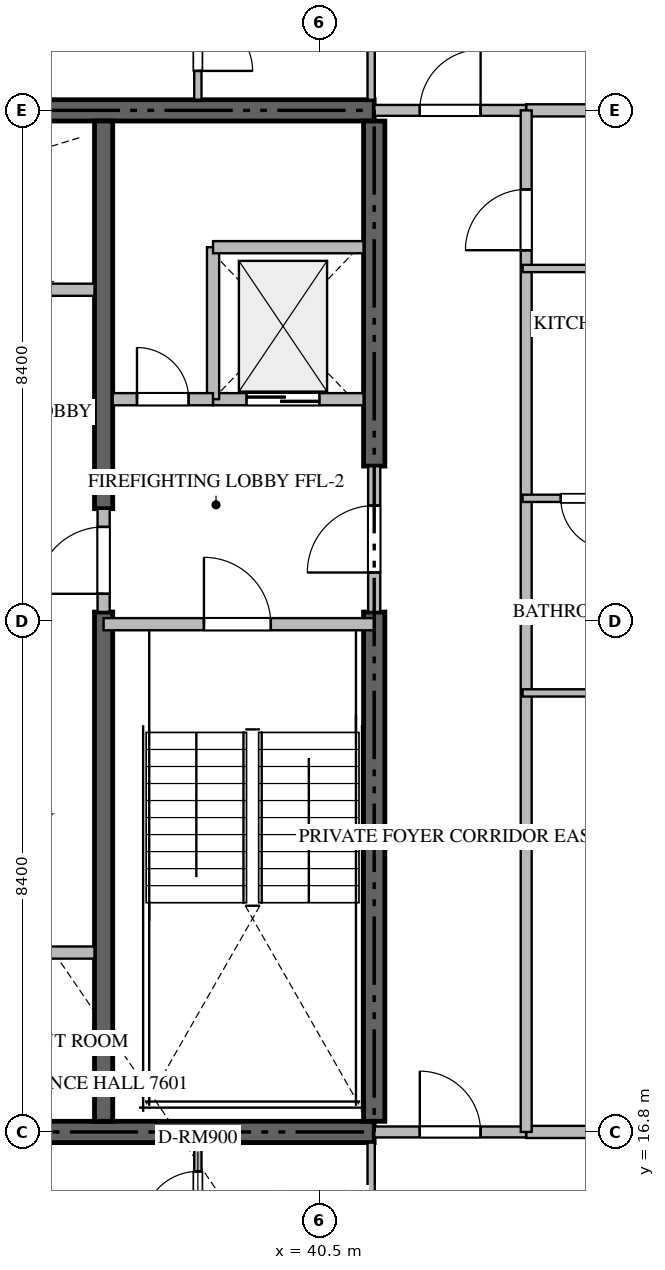
"""IFC4 building model, lengths in metres.
Left out: names, types, materials, properties, quantities, classifications, styles, units other than length and angle.
Written with IfcOpenShell. Run it as: python <this file> out.ifc"""

import sys

from ifc_helpers import new_model, si_unit, direction, frame, frame_2d, origin, place, context, subcontext, project, spatial, rectangle, extrude, source, transform, mapped, element, fill, save


model = new_model("IFC4")
c1 = context("Model", 3, precision=1e-05, world=origin(), true_north=direction((0.0, 1.0)))
c2 = subcontext(c1, "Body", "Model", "MODEL_VIEW")
j1 = project(units=[si_unit("LENGTHUNIT", "METRE"), si_unit("PLANEANGLEUNIT", "RADIAN")], contexts=[c1])
p1 = place(None, origin())
s1 = spatial("IfcSite", under=j1, at=p1, CompositionType="ELEMENT")
p2 = place(p1, origin())
s2 = spatial("IfcBuilding", under=s1, at=p2, CompositionType="ELEMENT")
p3 = place(p2, frame((0.0, 0.0, 305.6)))
s3 = spatial("IfcBuildingStorey", under=s2, at=p3, CompositionType="ELEMENT", Elevation=305.6)
for number, where, z_axis, x_axis in (
    (1, (23.4, 16.8, -0.26), (0.0, 0.0, 1.0), (1.0, 0.0, 0.0)),
    (2, (41.4, 33.6, -0.26), (0.0, 0.0, 1.0), (-1.0, 0.0, 0.0)),
):
    element("IfcWall", number, at=place(p3, frame(where, z_axis=z_axis, x_axis=x_axis)), inside=s3, PredefinedType="SHEAR", context=c2, shape_type="SweptSolid", body=[
        extrude(rectangle(XDim=18.0, YDim=0.35, at=frame_2d((9.0, 0.0))), origin(), (0.0, 0.0, 1.0), 4.048),
    ])
p4 = place(p3, frame((41.4, 16.975, -0.26), z_axis=(0.0, 0.0, 1.0), x_axis=(0.0, 1.0, 0.0)))
e3 = element("IfcWall", 3, at=p4, inside=s3, PredefinedType="SHEAR", context=c2, shape_type="SweptSolid", body=[
    extrude(rectangle(XDim=8.375, YDim=0.35, at=frame_2d((4.188, 0.0))), origin(), (0.0, 0.0, 1.0), 4.048),
])
p5 = place(p3, frame((41.4, 27.75, -0.26), z_axis=(0.0, 0.0, 1.0), x_axis=(0.0, 1.0, 0.0)))
e4 = element("IfcWall", 4, at=p5, inside=s3, PredefinedType="SHEAR", context=c2, shape_type="SweptSolid", body=[
    extrude(rectangle(XDim=5.675, YDim=0.35, at=frame_2d((2.837, 0.0))), origin(), (0.0, 0.0, 1.0), 4.048),
])
p6 = place(p3, frame((36.95, 16.975, -0.26), z_axis=(0.0, 0.0, 1.0), x_axis=(0.0, 1.0, 0.0)))
e5 = element("IfcWall", 5, at=p6, inside=s3, PredefinedType="SHEAR", context=c2, shape_type="SweptSolid", body=[
    extrude(rectangle(XDim=8.375, YDim=0.3, at=frame_2d((4.188, 0.0))), origin(), (0.0, 0.0, 1.0), 4.048),
])
p7 = place(p3, frame((36.95, 27.05, -0.26), z_axis=(0.0, 0.0, 1.0), x_axis=(0.0, 1.0, 0.0)))
e6 = element("IfcWall", 6, at=p7, inside=s3, PredefinedType="SHEAR", context=c2, shape_type="SweptSolid", body=[
    extrude(rectangle(XDim=6.375, YDim=0.3, at=frame_2d((3.188, 0.0))), origin(), (0.0, 0.0, 1.0), 4.048),
])
p8 = place(p3, frame((36.95, 25.15, 0.0), z_axis=(0.0, 0.0, 1.0), x_axis=(1.0, 0.0, 0.0)))
e7 = element("IfcWall", 7, at=p8, inside=s3, PredefinedType="STANDARD", context=c2, shape_type="SweptSolid", body=[
    extrude(rectangle(XDim=4.45, YDim=0.2, at=frame_2d((2.225, 0.0))), origin(), (0.0, 0.0, 1.0), 3.79),
])
p9 = place(p8, frame((1.65, 0.0, 0.0)))
e8 = element("IfcOpeningElement", 8, at=p9, cuts=e7, PredefinedType="OPENING", context=c2, shape_type="SweptSolid", body=[
    extrude(rectangle(XDim=1.1, YDim=2.15, at=frame_2d((0.55, 1.075))), frame((0.0, 0.11, 0.0), z_axis=(0.0, -1.0, 0.0), x_axis=(1.0, 0.0, 0.0)), (0.0, 0.0, 1.0), 0.22),
])
p10 = place(p3, frame((38.75, 28.85, 0.0), z_axis=(0.0, 0.0, 1.0), x_axis=(1.0, 0.0, 0.0)))
e9 = element("IfcWall", 9, at=p10, inside=s3, PredefinedType="STANDARD", context=c2, shape_type="SweptSolid", body=[
    extrude(rectangle(XDim=2.475, YDim=0.2, at=frame_2d((1.238, 0.0))), origin(), (0.0, 0.0, 1.0), 3.79),
])
p11 = place(p10, frame((0.55, 0.0, 0.0)))
e10 = element("IfcOpeningElement", 10, at=p11, cuts=e9, PredefinedType="OPENING", context=c2, shape_type="SweptSolid", body=[
    extrude(rectangle(XDim=1.2, YDim=2.2, at=frame_2d((0.6, 1.1))), frame((0.0, 0.11, 0.0), z_axis=(0.0, -1.0, 0.0), x_axis=(1.0, 0.0, 0.0)), (0.0, 0.0, 1.0), 0.22),
])
p12 = place(p3, frame((35.0, 30.65, 0.0), z_axis=(0.0, 0.0, 1.0), x_axis=(1.0, 0.0, 0.0)))
e11 = element("IfcWall", 11, at=p12, inside=s3, PredefinedType="STANDARD", context=c2, shape_type="SweptSolid", body=[
    extrude(rectangle(XDim=1.8, YDim=0.2, at=frame_2d((0.9, 0.0))), origin(), (0.0, 0.0, 1.0), 3.79),
])
p13 = place(p3, frame((38.75, 28.85, 0.0), z_axis=(0.0, 0.0, 1.0), x_axis=(0.0, 1.0, 0.0)))
e12 = element("IfcWall", 12, at=p13, inside=s3, PredefinedType="STANDARD", context=c2, shape_type="SweptSolid", body=[
    extrude(rectangle(XDim=2.5, YDim=0.2, at=frame_2d((1.25, 0.0))), origin(), (0.0, 0.0, 1.0), 3.79),
])
p14 = place(p3, frame((38.75, 31.35, 0.0), z_axis=(0.0, 0.0, 1.0), x_axis=(1.0, 0.0, 0.0)))
e13 = element("IfcWall", 13, at=p14, inside=s3, PredefinedType="STANDARD", context=c2, shape_type="SweptSolid", body=[
    extrude(rectangle(XDim=2.475, YDim=0.2, at=frame_2d((1.238, 0.0))), origin(), (0.0, 0.0, 1.0), 3.79),
])
p15 = place(p3, frame((37.1, 28.85, 0.0), z_axis=(0.0, 0.0, 1.0), x_axis=(1.0, 0.0, 0.0)))
e14 = element("IfcWall", 14, at=p15, inside=s3, PredefinedType="STANDARD", context=c2, shape_type="SweptSolid", body=[
    extrude(rectangle(XDim=1.648, YDim=0.2, at=frame_2d((0.824, 0.0))), origin(), (0.0, 0.0, 1.0), 3.79),
])
p16 = place(p15, frame((0.399, 0.0, 0.0)))
e15 = element("IfcOpeningElement", 15, at=p16, cuts=e14, PredefinedType="OPENING", context=c2, shape_type="SweptSolid", body=[
    extrude(rectangle(XDim=0.85, YDim=2.1, at=frame_2d((0.425, 1.05))), frame((0.0, 0.11, 0.0), z_axis=(0.0, -1.0, 0.0), x_axis=(1.0, 0.0, 0.0)), (0.0, 0.0, 1.0), 0.22),
])
p17 = place(p3, frame((41.4, 25.352, 0.0), z_axis=(0.0, 0.0, 1.0), x_axis=(0.0, 1.0, 0.0)))
e16 = element("IfcWall", 16, at=p17, inside=s3, PredefinedType="STANDARD", context=c2, shape_type="SweptSolid", body=[
    extrude(rectangle(XDim=2.396, YDim=0.2, at=frame_2d((1.198, 0.0))), origin(), (0.0, 0.0, 1.0), 3.79),
])
p18 = place(p17, frame((0.648, 0.0, 0.0)))
e17 = element("IfcOpeningElement", 17, at=p18, cuts=e16, PredefinedType="OPENING", context=c2, shape_type="SweptSolid", body=[
    extrude(rectangle(XDim=1.1, YDim=2.15, at=frame_2d((0.55, 1.075))), frame((0.0, 0.11, 0.0), z_axis=(0.0, -1.0, 0.0), x_axis=(1.0, 0.0, 0.0)), (0.0, 0.0, 1.0), 0.22),
])
p19 = place(p3, frame((36.95, 25.352, 0.0), z_axis=(0.0, 0.0, 1.0), x_axis=(0.0, 1.0, 0.0)))
e18 = element("IfcWall", 18, at=p19, inside=s3, PredefinedType="STANDARD", context=c2, shape_type="SweptSolid", body=[
    extrude(rectangle(XDim=1.696, YDim=0.2, at=frame_2d((0.848, 0.0))), origin(), (0.0, 0.0, 1.0), 3.79),
])
p20 = place(p19, frame((0.298, 0.0, 0.0)))
e19 = element("IfcOpeningElement", 19, at=p20, cuts=e18, PredefinedType="OPENING", context=c2, shape_type="SweptSolid", body=[
    extrude(rectangle(XDim=1.1, YDim=2.15, at=frame_2d((0.55, 1.075))), frame((0.0, 0.11, 0.0), z_axis=(0.0, -1.0, 0.0), x_axis=(1.0, 0.0, 0.0)), (0.0, 0.0, 1.0), 0.22),
])
p21 = place(p3, frame((28.0, 19.75, 0.0), z_axis=(0.0, 0.0, 1.0), x_axis=(1.0, 0.0, 0.0)))
e20 = element("IfcWall", 20, at=p21, inside=s3, PredefinedType="STANDARD", context=c2, shape_type="SweptSolid", body=[
    extrude(rectangle(XDim=8.8, YDim=0.2, at=frame_2d((4.4, 0.0))), origin(), (0.0, 0.0, 1.0), 3.79),
])
p22 = place(p21, frame((3.95, 0.0, 0.0)))
e21 = element("IfcOpeningElement", 21, at=p22, cuts=e20, PredefinedType="OPENING", context=c2, shape_type="SweptSolid", body=[
    extrude(rectangle(XDim=0.9, YDim=2.1, at=frame_2d((0.45, 1.05))), frame((0.0, 0.11, 0.0), z_axis=(0.0, -1.0, 0.0), x_axis=(1.0, 0.0, 0.0)), (0.0, 0.0, 1.0), 0.22),
])
for number, where, z_axis, x_axis in (
    (22, (43.9, 16.8, 0.0), (0.0, 0.0, 1.0), (1.0, 0.0, 0.0)),
    (23, (43.9, 33.6, 0.0), (0.0, 0.0, 1.0), (1.0, 0.0, 0.0)),
):
    element("IfcWall", number, at=place(p3, frame(where, z_axis=z_axis, x_axis=x_axis)), inside=s3, PredefinedType="PARTITIONING", context=c2, shape_type="SweptSolid", body=[
        extrude(rectangle(XDim=11.618, YDim=0.2, at=frame_2d((5.809, 0.0))), origin(), (0.0, 0.0, 1.0), 3.79),
    ])
p23 = place(p3, frame((41.402, 16.8, 0.0), z_axis=(0.0, 0.0, 1.0), x_axis=(1.0, 0.0, 0.0)))
e24 = element("IfcWall", 24, at=p23, inside=s3, PredefinedType="PARTITIONING", context=c2, shape_type="SweptSolid", body=[
    extrude(rectangle(XDim=2.496, YDim=0.18, at=frame_2d((1.248, 0.0))), origin(), (0.0, 0.0, 1.0), 3.79),
])
p24 = place(p23, frame((0.748, 0.0, 0.0)))
e25 = element("IfcOpeningElement", 25, at=p24, cuts=e24, PredefinedType="OPENING", context=c2, shape_type="SweptSolid", body=[
    extrude(rectangle(XDim=1.0, YDim=2.15, at=frame_2d((0.5, 1.075))), frame((0.0, 0.1, 0.0), z_axis=(0.0, -1.0, 0.0), x_axis=(1.0, 0.0, 0.0)), (0.0, 0.0, 1.0), 0.2),
])
p25 = place(p3, frame((41.402, 33.6, 0.0), z_axis=(0.0, 0.0, 1.0), x_axis=(1.0, 0.0, 0.0)))
e26 = element("IfcWall", 26, at=p25, inside=s3, PredefinedType="PARTITIONING", context=c2, shape_type="SweptSolid", body=[
    extrude(rectangle(XDim=2.496, YDim=0.18, at=frame_2d((1.248, 0.0))), origin(), (0.0, 0.0, 1.0), 3.79),
])
p26 = place(p25, frame((0.748, 0.0, 0.0)))
e27 = element("IfcOpeningElement", 27, at=p26, cuts=e26, PredefinedType="OPENING", context=c2, shape_type="SweptSolid", body=[
    extrude(rectangle(XDim=1.0, YDim=2.15, at=frame_2d((0.5, 1.075))), frame((0.0, 0.1, 0.0), z_axis=(0.0, -1.0, 0.0), x_axis=(1.0, 0.0, 0.0)), (0.0, 0.0, 1.0), 0.2),
])
p27 = place(p3, frame((43.9, 16.8, 0.0), z_axis=(0.0, 0.0, 1.0), x_axis=(0.0, 1.0, 0.0)))
e28 = element("IfcWall", 28, at=p27, inside=s3, PredefinedType="PARTITIONING", context=c2, shape_type="SweptSolid", body=[
    extrude(rectangle(XDim=16.8, YDim=0.18, at=frame_2d((8.4, 0.0))), origin(), (0.0, 0.0, 1.0), 3.79),
])
p28 = place(p27, frame((14.5, 0.0, 0.0)))
e29 = element("IfcOpeningElement", 29, at=p28, cuts=e28, PredefinedType="OPENING", context=c2, shape_type="SweptSolid", body=[
    extrude(rectangle(XDim=1.0, YDim=2.15, at=frame_2d((0.5, 1.075))), frame((0.0, 0.1, 0.0), z_axis=(0.0, -1.0, 0.0), x_axis=(1.0, 0.0, 0.0)), (0.0, 0.0, 1.0), 0.2),
])
p29 = place(p3, frame((41.35, 14.05, 0.0), z_axis=(0.0, 0.0, 1.0), x_axis=(0.0, 1.0, 0.0)))
e30 = element("IfcWall", 30, at=p29, inside=s3, PredefinedType="PARTITIONING", context=c2, shape_type="SweptSolid", body=[
    extrude(rectangle(XDim=2.575, YDim=0.12, at=frame_2d((1.288, 0.0))), origin(), (0.0, 0.0, 1.0), 3.79),
])
p30 = place(p3, frame((38.5, 14.65, 0.0), z_axis=(0.0, 0.0, 1.0), x_axis=(0.0, 1.0, 0.0)))
e31 = element("IfcWall", 31, at=p30, inside=s3, PredefinedType="PARTITIONING", context=c2, shape_type="SweptSolid", body=[
    extrude(rectangle(XDim=1.975, YDim=0.12, at=frame_2d((0.988, 0.0))), origin(), (0.0, 0.0, 1.0), 3.79),
])
p31 = place(p30, frame((0.601, 0.0, 0.0)))
e32 = element("IfcOpeningElement", 32, at=p31, cuts=e31, PredefinedType="OPENING", context=c2, shape_type="SweptSolid", body=[
    extrude(rectangle(XDim=0.9, YDim=2.1, at=frame_2d((0.45, 1.05))), frame((0.0, 0.07, 0.0), z_axis=(0.0, -1.0, 0.0), x_axis=(1.0, 0.0, 0.0)), (0.0, 0.0, 1.0), 0.14),
])
p32 = place(p3, frame((41.35, 36.35, 0.0), z_axis=(0.0, 0.0, 1.0), x_axis=(0.0, -1.0, 0.0)))
e33 = element("IfcWall", 33, at=p32, inside=s3, PredefinedType="PARTITIONING", context=c2, shape_type="SweptSolid", body=[
    extrude(rectangle(XDim=2.575, YDim=0.12, at=frame_2d((1.288, 0.0))), origin(), (0.0, 0.0, 1.0), 3.79),
])
p33 = place(p3, frame((38.5, 35.75, 0.0), z_axis=(0.0, 0.0, 1.0), x_axis=(0.0, -1.0, 0.0)))
e34 = element("IfcWall", 34, at=p33, inside=s3, PredefinedType="PARTITIONING", context=c2, shape_type="SweptSolid", body=[
    extrude(rectangle(XDim=1.975, YDim=0.12, at=frame_2d((0.988, 0.0))), origin(), (0.0, 0.0, 1.0), 3.79),
])
p34 = place(p33, frame((0.601, 0.0, 0.0)))
e35 = element("IfcOpeningElement", 35, at=p34, cuts=e34, PredefinedType="OPENING", context=c2, shape_type="SweptSolid", body=[
    extrude(rectangle(XDim=0.9, YDim=2.1, at=frame_2d((0.45, 1.05))), frame((0.0, 0.07, 0.0), z_axis=(0.0, -1.0, 0.0), x_axis=(1.0, 0.0, 0.0)), (0.0, 0.0, 1.0), 0.14),
])
p35 = place(p3, frame((46.65, 31.0, 0.0), z_axis=(0.0, 0.0, 1.0), x_axis=(-1.0, 0.0, 0.0)))
e36 = element("IfcWall", 36, at=p35, inside=s3, PredefinedType="PARTITIONING", context=c2, shape_type="SweptSolid", body=[
    extrude(rectangle(XDim=2.81, YDim=0.12, at=frame_2d((1.405, 0.0))), origin(), (0.0, 0.0, 1.0), 3.79),
])
p36 = place(p3, frame((45.95, 24.02, 0.0), z_axis=(0.0, 0.0, 1.0), x_axis=(-1.0, 0.0, 0.0)))
e37 = element("IfcWall", 37, at=p36, inside=s3, PredefinedType="PARTITIONING", context=c2, shape_type="SweptSolid", body=[
    extrude(rectangle(XDim=2.11, YDim=0.12, at=frame_2d((1.055, 0.0))), origin(), (0.0, 0.0, 1.0), 3.79),
])
p37 = place(p3, frame((45.948, 27.22, 0.0), z_axis=(0.0, 0.0, 1.0), x_axis=(-1.0, 0.0, 0.0)))
e38 = element("IfcWall", 38, at=p37, inside=s3, PredefinedType="PARTITIONING", context=c2, shape_type="SweptSolid", body=[
    extrude(rectangle(XDim=2.108, YDim=0.12, at=frame_2d((1.054, 0.0))), origin(), (0.0, 0.0, 1.0), 3.79),
])
p38 = place(p37, frame((0.629, 0.0, 0.0)))
e39 = element("IfcOpeningElement", 39, at=p38, cuts=e38, PredefinedType="OPENING", context=c2, shape_type="SweptSolid", body=[
    extrude(rectangle(XDim=0.85, YDim=2.1, at=frame_2d((0.425, 1.05))), frame((0.0, 0.07, 0.0), z_axis=(0.0, -1.0, 0.0), x_axis=(1.0, 0.0, 0.0)), (0.0, 0.0, 1.0), 0.14),
])
m1 = source(origin(), c2, "Body", "SweptSolid", [
    extrude(rectangle(XDim=1.1, YDim=2.15, at=frame_2d((0.55, 1.075))), frame((0.0, 0.025, 0.0), z_axis=(0.0, -1.0, 0.0), x_axis=(1.0, 0.0, 0.0)), (0.0, 0.0, 1.0), 0.05),
])
p39 = place(p9, origin())
e40 = element("IfcDoor", 40, at=p39, inside=s3, OperationType="SINGLE_SWING_LEFT", PredefinedType="DOOR", context=c2, shape_type="MappedRepresentation", body=[
    mapped(m1, transform((0.0, 0.0, 0.0), scale=1.0)),
])
fill(e8, e40)
m2 = source(origin(), c2, "Body", "SweptSolid", [
    extrude(rectangle(XDim=1.2, YDim=2.2, at=frame_2d((0.6, 1.1))), frame((0.0, 0.025, 0.0), z_axis=(0.0, -1.0, 0.0), x_axis=(1.0, 0.0, 0.0)), (0.0, 0.0, 1.0), 0.05),
])
p40 = place(p11, origin())
e41 = element("IfcDoor", 41, at=p40, inside=s3, OperationType="DOUBLE_DOOR_SLIDING", PredefinedType="DOOR", context=c2, shape_type="MappedRepresentation", body=[
    mapped(m2, transform((0.0, 0.0, 0.0), scale=1.0)),
])
fill(e10, e41)
m3 = source(origin(), c2, "Body", "SweptSolid", [
    extrude(rectangle(XDim=0.85, YDim=2.1, at=frame_2d((0.425, 1.05))), frame((0.0, 0.025, 0.0), z_axis=(0.0, -1.0, 0.0), x_axis=(1.0, 0.0, 0.0)), (0.0, 0.0, 1.0), 0.05),
])
p41 = place(p16, origin())
e42 = element("IfcDoor", 42, at=p41, inside=s3, OperationType="SINGLE_SWING_LEFT", PredefinedType="DOOR", context=c2, shape_type="MappedRepresentation", body=[
    mapped(m3, transform((0.0, 0.0, 0.0), scale=1.0)),
])
fill(e15, e42)
p42 = place(p18, origin())
e43 = element("IfcDoor", 43, at=p42, inside=s3, OperationType="SINGLE_SWING_LEFT", PredefinedType="DOOR", context=c2, shape_type="MappedRepresentation", body=[
    mapped(m1, transform((0.0, 0.0, 0.0), scale=1.0)),
])
fill(e17, e43)
p43 = place(p20, origin())
e44 = element("IfcDoor", 44, at=p43, inside=s3, OperationType="SINGLE_SWING_LEFT", PredefinedType="DOOR", context=c2, shape_type="MappedRepresentation", body=[
    mapped(m1, transform((0.0, 0.0, 0.0), scale=1.0)),
])
fill(e19, e44)
m4 = source(origin(), c2, "Body", "SweptSolid", [
    extrude(rectangle(XDim=1.0, YDim=2.15, at=frame_2d((0.5, 1.075))), frame((0.0, 0.025, 0.0), z_axis=(0.0, -1.0, 0.0), x_axis=(1.0, 0.0, 0.0)), (0.0, 0.0, 1.0), 0.05),
])
p44 = place(p24, origin())
e45 = element("IfcDoor", 45, at=p44, inside=s3, OperationType="SINGLE_SWING_LEFT", PredefinedType="DOOR", context=c2, shape_type="MappedRepresentation", body=[
    mapped(m4, transform((0.0, 0.0, 0.0), scale=1.0)),
])
fill(e25, e45)
p45 = place(p26, origin())
e46 = element("IfcDoor", 46, at=p45, inside=s3, OperationType="SINGLE_SWING_RIGHT", PredefinedType="DOOR", context=c2, shape_type="MappedRepresentation", body=[
    mapped(m4, transform((0.0, 0.0, 0.0), scale=1.0)),
])
fill(e27, e46)
p46 = place(p28, origin())
e47 = element("IfcDoor", 47, at=p46, inside=s3, OperationType="SINGLE_SWING_LEFT", PredefinedType="DOOR", context=c2, shape_type="MappedRepresentation", body=[
    mapped(m4, transform((0.0, 0.0, 0.0), scale=1.0)),
])
fill(e29, e47)
m5 = source(origin(), c2, "Body", "SweptSolid", [
    extrude(rectangle(XDim=0.9, YDim=2.1, at=frame_2d((0.45, 1.05))), frame((0.0, 0.025, 0.0), z_axis=(0.0, -1.0, 0.0), x_axis=(1.0, 0.0, 0.0)), (0.0, 0.0, 1.0), 0.05),
])
p47 = place(p31, origin())
e48 = element("IfcDoor", 48, at=p47, inside=s3, OperationType="SINGLE_SWING_LEFT", PredefinedType="DOOR", context=c2, shape_type="MappedRepresentation", body=[
    mapped(m5, transform((0.0, 0.0, 0.0), scale=1.0)),
])
fill(e32, e48)
p48 = place(p34, origin())
e49 = element("IfcDoor", 49, at=p48, inside=s3, OperationType="SINGLE_SWING_RIGHT", PredefinedType="DOOR", context=c2, shape_type="MappedRepresentation", body=[
    mapped(m5, transform((0.0, 0.0, 0.0), scale=1.0)),
])
fill(e35, e49)
p49 = place(p38, origin())
e50 = element("IfcDoor", 50, at=p49, inside=s3, OperationType="SINGLE_SWING_LEFT", PredefinedType="DOOR", context=c2, shape_type="MappedRepresentation", body=[
    mapped(m3, transform((0.0, 0.0, 0.0), scale=1.0)),
])
fill(e39, e50)
save(model, sys.argv[1])
